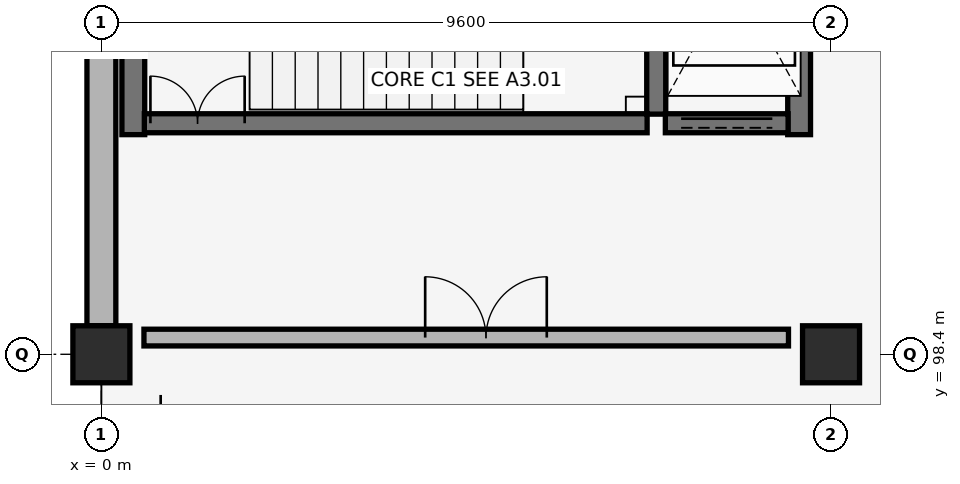
"""IFC4 building model, lengths in metres.
Left out: names, types, materials, properties, quantities, classifications, styles, units other than length and angle.
Written with IfcOpenShell. Run it as: python <this file> out.ifc"""

import sys

from ifc_helpers import new_model, si_unit, direction, frame, frame_2d, origin, origin_2d, place, context, subcontext, project, spatial, rectangle, circle, extrude, element, fill, save


model = new_model("IFC4")
c1 = context("Model", 3, precision=1e-05, world=origin(), true_north=direction((0.0, 1.0)))
c2 = subcontext(c1, "Body", "Model", "MODEL_VIEW")
j1 = project(units=[si_unit("LENGTHUNIT", "METRE"), si_unit("PLANEANGLEUNIT", "RADIAN")], contexts=[c1])
p1 = place(None, origin())
s1 = spatial("IfcSite", under=j1, at=p1, CompositionType="ELEMENT")
p2 = place(p1, origin())
s2 = spatial("IfcBuilding", under=s1, at=p2, CompositionType="ELEMENT")
p3 = place(p2, origin())
s3 = spatial("IfcBuildingStorey", under=s2, at=p3, CompositionType="ELEMENT", Elevation=0.0)
for number, where, z_axis, x_axis in (
    (1, (0.0, 98.4, -0.44), (0.0, 0.0, 1.0), (1.0, 0.0, 0.0)),
    (2, (9.6, 98.4, -0.44), (0.0, 0.0, 1.0), (1.0, 0.0, 0.0)),
):
    element("IfcColumn", number, at=place(p3, frame(where, z_axis=z_axis, x_axis=x_axis)), inside=s3, PredefinedType="COLUMN", context=c2, shape_type="SweptSolid", body=[
        extrude(circle(Radius=0.375, at=origin_2d()), origin(), (0.0, 0.0, 1.0), 4.86),
    ])
p4 = place(p3, frame((0.0, 105.225, 0.0), z_axis=(0.0, 0.0, 1.0), x_axis=(0.0, -1.0, 0.0)))
e3 = element("IfcWall", 3, at=p4, inside=s3, PredefinedType="SOLIDWALL", context=c2, shape_type="SweptSolid", body=[
    extrude(rectangle(XDim=6.45, YDim=0.38, at=frame_2d((3.225, 0.0))), origin(), (0.0, 0.0, 1.0), 3.42),
])
for number, where, z_axis, x_axis in (
    (4, (0.42, 101.29, 0.0), (0.0, 0.0, 1.0), (0.0, 1.0, 0.0)),
    (5, (9.18, 101.29, 0.0), (0.0, 0.0, 1.0), (0.0, 1.0, 0.0)),
):
    element("IfcWall", number, at=place(p3, frame(where, z_axis=z_axis, x_axis=x_axis)), inside=s3, PredefinedType="SHEAR", context=c2, shape_type="SweptSolid", body=[
        extrude(rectangle(XDim=4.1, YDim=0.3, at=frame_2d((2.05, 0.0))), origin(), (0.0, 0.0, 1.0), 4.14),
    ])
p5 = place(p3, frame((7.3, 101.56, 0.0), z_axis=(0.0, 0.0, 1.0), x_axis=(0.0, 1.0, 0.0)))
e6 = element("IfcWall", 6, at=p5, inside=s3, PredefinedType="SHEAR", context=c2, shape_type="SweptSolid", body=[
    extrude(rectangle(XDim=3.53, YDim=0.25, at=frame_2d((1.765, 0.0))), origin(), (0.0, 0.0, 1.0), 4.14),
])
p6 = place(p3, frame((0.565, 101.44, 0.0), z_axis=(0.0, 0.0, 1.0), x_axis=(1.0, 0.0, 0.0)))
e7 = element("IfcWall", 7, at=p6, inside=s3, PredefinedType="SHEAR", context=c2, shape_type="SweptSolid", body=[
    extrude(rectangle(XDim=6.615, YDim=0.25, at=frame_2d((3.308, 0.0))), origin(), (0.0, 0.0, 1.0), 4.14),
])
p7 = place(p6, frame((0.08, 0.0, 0.0)))
e8 = element("IfcOpeningElement", 8, at=p7, cuts=e7, PredefinedType="OPENING", context=c2, shape_type="SweptSolid", body=[
    extrude(rectangle(XDim=1.24, YDim=2.15, at=frame_2d((0.62, 1.075))), frame((0.0, 0.135, 0.0), z_axis=(0.0, -1.0, 0.0), x_axis=(1.0, 0.0, 0.0)), (0.0, 0.0, 1.0), 0.27),
])
p8 = place(p3, frame((0.56, 98.62, 0.0), z_axis=(0.0, 0.0, 1.0), x_axis=(1.0, 0.0, 0.0)))
e9 = element("IfcWall", 9, at=p8, inside=s3, PredefinedType="PARTITIONING", context=c2, shape_type="SweptSolid", body=[
    extrude(rectangle(XDim=8.48, YDim=0.22, at=frame_2d((4.24, 0.0))), origin(), (0.0, 0.0, 1.0), 3.47),
])
p9 = place(p8, frame((3.7, 0.0, 0.0)))
e10 = element("IfcOpeningElement", 10, at=p9, cuts=e9, PredefinedType="OPENING", context=c2, shape_type="SweptSolid", body=[
    extrude(rectangle(XDim=1.6, YDim=2.2, at=frame_2d((0.8, 1.1))), frame((0.0, 0.12, 0.0), z_axis=(0.0, -1.0, 0.0), x_axis=(1.0, 0.0, 0.0)), (0.0, 0.0, 1.0), 0.24),
])
p10 = place(p3, frame((7.42, 101.44, 0.0), z_axis=(0.0, 0.0, 1.0), x_axis=(1.0, 0.0, 0.0)))
e11 = element("IfcWall", 11, at=p10, inside=s3, PredefinedType="SHEAR", context=c2, shape_type="SweptSolid", body=[
    extrude(rectangle(XDim=1.615, YDim=0.25, at=frame_2d((0.808, 0.0))), origin(), (0.0, 0.0, 1.0), 4.14),
])
p11 = place(p10, frame((0.208, 0.0, 0.0)))
e12 = element("IfcOpeningElement", 12, at=p11, cuts=e11, PredefinedType="OPENING", context=c2, shape_type="SweptSolid", body=[
    extrude(rectangle(XDim=1.2, YDim=2.15, at=frame_2d((0.6, 1.075))), frame((0.0, 0.135, 0.0), z_axis=(0.0, -1.0, 0.0), x_axis=(1.0, 0.0, 0.0)), (0.0, 0.0, 1.0), 0.27),
])
p12 = place(p7, origin())
e13 = element("IfcDoor", 13, at=p12, inside=s3, OperationType="DOUBLE_DOOR_SINGLE_SWING", PredefinedType="DOOR", context=c2, shape_type="SweptSolid", body=[
    extrude(rectangle(XDim=1.24, YDim=2.15, at=frame_2d((0.62, 1.075))), frame((0.0, 0.025, 0.0), z_axis=(0.0, -1.0, 0.0), x_axis=(1.0, 0.0, 0.0)), (0.0, 0.0, 1.0), 0.05),
])
fill(e8, e13)
p13 = place(p9, origin())
e14 = element("IfcDoor", 14, at=p13, inside=s3, OperationType="DOUBLE_DOOR_SINGLE_SWING", PredefinedType="DOOR", context=c2, shape_type="SweptSolid", body=[
    extrude(rectangle(XDim=1.6, YDim=2.2, at=frame_2d((0.8, 1.1))), frame((0.0, 0.025, 0.0), z_axis=(0.0, -1.0, 0.0), x_axis=(1.0, 0.0, 0.0)), (0.0, 0.0, 1.0), 0.05),
])
fill(e10, e14)
p14 = place(p11, origin())
e15 = element("IfcDoor", 15, at=p14, inside=s3, OperationType="DOUBLE_DOOR_SLIDING", PredefinedType="DOOR", context=c2, shape_type="SweptSolid", body=[
    extrude(rectangle(XDim=1.2, YDim=2.15, at=frame_2d((0.6, 1.075))), frame((0.0, 0.025, 0.0), z_axis=(0.0, -1.0, 0.0), x_axis=(1.0, 0.0, 0.0)), (0.0, 0.0, 1.0), 0.05),
])
fill(e12, e15)
save(model, sys.argv[1])
